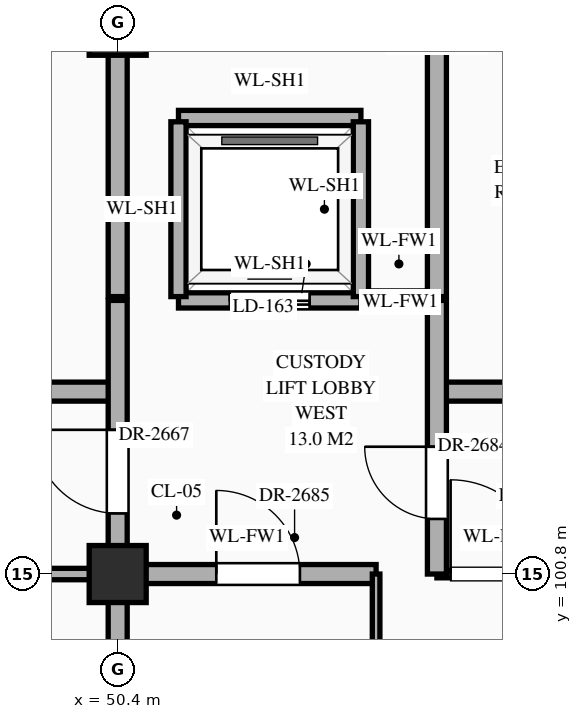
"""IFC4 building model, lengths in metres.
Left out: names, types, materials, properties, quantities, classifications, styles, units other than length and angle.
Written with IfcOpenShell. Run it as: python <this file> out.ifc"""

import sys

from ifc_helpers import new_model, si_unit, direction, frame, frame_2d, origin, origin_2d, place, context, subcontext, project, spatial, rectangle, extrude, element, fill, save


model = new_model("IFC4")
c1 = context("Model", 3, precision=1e-05, world=origin(), true_north=direction((0.0, 1.0)))
c2 = subcontext(c1, "Body", "Model", "MODEL_VIEW")
j1 = project(units=[si_unit("LENGTHUNIT", "METRE"), si_unit("PLANEANGLEUNIT", "RADIAN")], contexts=[c1])
p1 = place(None, origin())
s1 = spatial("IfcSite", under=j1, at=p1, CompositionType="ELEMENT")
p2 = place(p1, origin())
s2 = spatial("IfcBuilding", under=s1, at=p2, CompositionType="ELEMENT")
p3 = place(p2, frame((0.0, 0.0, 39.3)))
s3 = spatial("IfcBuildingStorey", under=s2, at=p3, CompositionType="ELEMENT", Elevation=39.3)
for number, where, z_axis, x_axis in (
    (1, (50.4, 100.8, 0.0), (0.0, 0.0, 1.0), (1.0, 0.0, 0.0)),
    (2, (50.4, 108.0, 0.0), (0.0, 0.0, 1.0), (1.0, 0.0, 0.0)),
):
    element("IfcColumn", number, at=place(p3, frame(where, z_axis=z_axis, x_axis=x_axis)), inside=s3, PredefinedType="COLUMN", context=c2, shape_type="SweptSolid", body=[
        extrude(rectangle(XDim=0.75, YDim=0.75, at=origin_2d()), origin(), (0.0, 0.0, 1.0), 4.2),
    ])
p4 = place(p3, frame((46.2, 100.8, 0.0), z_axis=(0.0, 0.0, 1.0), x_axis=(1.0, 0.0, 0.0)))
e3 = element("IfcWall", 3, at=p4, inside=s3, PredefinedType="STANDARD", context=c2, shape_type="SweptSolid", body=[
    extrude(rectangle(XDim=4.2, YDim=0.15, at=frame_2d((2.1, 0.0))), origin(), (0.0, 0.0, 1.0), 3.1),
])
p5 = place(p4, frame((1.373, 0.0, 0.0)))
e4 = element("IfcOpeningElement", 4, at=p5, cuts=e3, PredefinedType="OPENING", context=c2, shape_type="SweptSolid", body=[
    extrude(rectangle(XDim=1.16, YDim=2.3, at=frame_2d((0.58, 1.15))), frame((0.0, 0.087, 0.0), z_axis=(0.0, -1.0, 0.0), x_axis=(1.0, 0.0, 0.0)), (0.0, 0.0, 1.0), 0.174),
])
p6 = place(p3, frame((50.4, 100.8, 0.0), z_axis=(0.0, 0.0, 1.0), x_axis=(1.0, 0.0, 0.0)))
e5 = element("IfcWall", 5, at=p6, inside=s3, PredefinedType="STANDARD", context=c2, shape_type="SweptSolid", body=[
    extrude(rectangle(XDim=3.4, YDim=0.25, at=frame_2d((1.7, 0.0))), origin(), (0.0, 0.0, 1.0), 3.1),
])
p7 = place(p6, frame((1.298, 0.0, 0.0)))
e6 = element("IfcOpeningElement", 6, at=p7, cuts=e5, PredefinedType="OPENING", context=c2, shape_type="SweptSolid", body=[
    extrude(rectangle(XDim=1.1, YDim=2.2, at=frame_2d((0.55, 1.1))), frame((0.0, 0.137, 0.0), z_axis=(0.0, -1.0, 0.0), x_axis=(1.0, 0.0, 0.0)), (0.0, 0.0, 1.0), 0.274),
])
p8 = place(p3, frame((54.6, 100.8, 0.0), z_axis=(0.0, 0.0, 1.0), x_axis=(1.0, 0.0, 0.0)))
e7 = element("IfcWall", 7, at=p8, inside=s3, PredefinedType="STANDARD", context=c2, shape_type="SweptSolid", body=[
    extrude(rectangle(XDim=1.6, YDim=0.1, at=frame_2d((0.8, 0.0))), origin(), (0.0, 0.0, 1.0), 3.1),
])
p9 = place(p8, frame((0.18, 0.0, 0.0)))
e8 = element("IfcOpeningElement", 8, at=p9, cuts=e7, PredefinedType="OPENING", context=c2, shape_type="SweptSolid", body=[
    extrude(rectangle(XDim=1.24, YDim=2.3, at=frame_2d((0.62, 1.15))), frame((0.0, 0.062, 0.0), z_axis=(0.0, -1.0, 0.0), x_axis=(1.0, 0.0, 0.0)), (0.0, 0.0, 1.0), 0.124),
])
p10 = place(p3, frame((46.2, 103.2, 0.0), z_axis=(0.0, 0.0, 1.0), x_axis=(1.0, 0.0, 0.0)))
e9 = element("IfcWall", 9, at=p10, inside=s3, PredefinedType="STANDARD", context=c2, shape_type="SweptSolid", body=[
    extrude(rectangle(XDim=4.2, YDim=0.25, at=frame_2d((2.1, 0.0))), origin(), (0.0, 0.0, 1.0), 3.95),
])
p11 = place(p10, frame((1.625, 0.0, 0.0)))
e10 = element("IfcOpeningElement", 10, at=p11, cuts=e9, PredefinedType="OPENING", context=c2, shape_type="SweptSolid", body=[
    extrude(rectangle(XDim=0.95, YDim=2.15, at=frame_2d((0.475, 1.075))), frame((0.0, 0.137, 0.0), z_axis=(0.0, -1.0, 0.0), x_axis=(1.0, 0.0, 0.0)), (0.0, 0.0, 1.0), 0.274),
])
p12 = place(p3, frame((54.6, 103.2, 0.0), z_axis=(0.0, 0.0, 1.0), x_axis=(1.0, 0.0, 0.0)))
e11 = element("IfcWall", 11, at=p12, inside=s3, PredefinedType="STANDARD", context=c2, shape_type="SweptSolid", body=[
    extrude(rectangle(XDim=4.2, YDim=0.25, at=frame_2d((2.1, 0.0))), origin(), (0.0, 0.0, 1.0), 3.95),
])
p13 = place(p12, frame((1.6, 0.0, 0.0)))
e12 = element("IfcOpeningElement", 12, at=p13, cuts=e11, PredefinedType="OPENING", context=c2, shape_type="SweptSolid", body=[
    extrude(rectangle(XDim=1.0, YDim=2.2, at=frame_2d((0.5, 1.1))), frame((0.0, 0.137, 0.0), z_axis=(0.0, -1.0, 0.0), x_axis=(1.0, 0.0, 0.0)), (0.0, 0.0, 1.0), 0.274),
])
p14 = place(p3, frame((51.2, 104.4, 0.0), z_axis=(0.0, 0.0, 1.0), x_axis=(1.0, 0.0, 0.0)))
e13 = element("IfcWall", 13, at=p14, inside=s3, PredefinedType="STANDARD", context=c2, shape_type="SweptSolid", body=[
    extrude(rectangle(XDim=2.4, YDim=0.2, at=frame_2d((1.2, 0.0))), origin(), (0.0, 0.0, 1.0), 3.95),
])
p15 = place(p14, frame((0.675, 0.0, 0.0)))
e14 = element("IfcOpeningElement", 14, at=p15, cuts=e13, PredefinedType="OPENING", context=c2, shape_type="SweptSolid", body=[
    extrude(rectangle(XDim=1.05, YDim=2.15, at=frame_2d((0.525, 1.075))), frame((0.0, 0.112, 0.0), z_axis=(0.0, -1.0, 0.0), x_axis=(1.0, 0.0, 0.0)), (0.0, 0.0, 1.0), 0.224),
])
p16 = place(p3, frame((53.65, 104.4, 0.0), z_axis=(0.0, 0.0, 1.0), x_axis=(1.0, 0.0, 0.0)))
e15 = element("IfcWall", 15, at=p16, inside=s3, PredefinedType="STANDARD", context=c2, shape_type="SweptSolid", body=[
    extrude(rectangle(XDim=0.9, YDim=0.25, at=frame_2d((0.45, 0.0))), origin(), (0.0, 0.0, 1.0), 3.95),
])
p17 = place(p3, frame((51.2, 106.8, 0.0), z_axis=(0.0, 0.0, 1.0), x_axis=(1.0, 0.0, 0.0)))
e16 = element("IfcWall", 16, at=p17, inside=s3, PredefinedType="STANDARD", context=c2, shape_type="SweptSolid", body=[
    extrude(rectangle(XDim=2.4, YDim=0.2, at=frame_2d((1.2, 0.0))), origin(), (0.0, 0.0, 1.0), 3.95),
])
p18 = place(p3, frame((50.4, 91.2, 0.0), z_axis=(0.0, 0.0, 1.0), x_axis=(0.0, 1.0, 0.0)))
e17 = element("IfcWall", 17, at=p18, inside=s3, PredefinedType="STANDARD", context=c2, shape_type="SweptSolid", body=[
    extrude(rectangle(XDim=13.2, YDim=0.25, at=frame_2d((6.6, 0.0))), origin(), (0.0, 0.0, 1.0), 3.2),
])
p19 = place(p18, frame((0.502, 0.0, 0.0)))
e18 = element("IfcOpeningElement", 18, at=p19, cuts=e17, PredefinedType="OPENING", context=c2, shape_type="SweptSolid", body=[
    extrude(rectangle(XDim=1.1, YDim=2.2, at=frame_2d((0.55, 1.1))), frame((0.0, 0.137, 0.0), z_axis=(0.0, -1.0, 0.0), x_axis=(1.0, 0.0, 0.0)), (0.0, 0.0, 1.0), 0.274),
])
p20 = place(p18, frame((10.397, 0.0, 0.0)))
e19 = element("IfcOpeningElement", 19, at=p20, cuts=e17, PredefinedType="OPENING", context=c2, shape_type="SweptSolid", body=[
    extrude(rectangle(XDim=1.1, YDim=2.2, at=frame_2d((0.55, 1.1))), frame((0.0, 0.137, 0.0), z_axis=(0.0, -1.0, 0.0), x_axis=(1.0, 0.0, 0.0)), (0.0, 0.0, 1.0), 0.274),
])
p21 = place(p18, frame((3.248, 0.0, 0.0)))
e20 = element("IfcOpeningElement", 20, at=p21, cuts=e17, PredefinedType="OPENING", context=c2, shape_type="SweptSolid", body=[
    extrude(rectangle(XDim=1.0, YDim=2.2, at=frame_2d((0.5, 1.1))), frame((0.0, 0.137, 0.0), z_axis=(0.0, -1.0, 0.0), x_axis=(1.0, 0.0, 0.0)), (0.0, 0.0, 1.0), 0.274),
])
p22 = place(p3, frame((50.4, 104.45, 0.0), z_axis=(0.0, 0.0, 1.0), x_axis=(0.0, 1.0, 0.0)))
e21 = element("IfcWall", 21, at=p22, inside=s3, PredefinedType="STANDARD", context=c2, shape_type="SweptSolid", body=[
    extrude(rectangle(XDim=3.46, YDim=0.25, at=frame_2d((1.73, 0.0))), origin(), (0.0, 0.0, 1.0), 3.2),
])
for number, where, z_axis, x_axis in (
    (22, (51.2, 104.45, 0.0), (0.0, 0.0, 1.0), (0.0, 1.0, 0.0)),
    (23, (53.6, 104.45, 0.0), (0.0, 0.0, 1.0), (0.0, 1.0, 0.0)),
):
    element("IfcWall", number, at=place(p3, frame(where, z_axis=z_axis, x_axis=x_axis)), inside=s3, PredefinedType="STANDARD", context=c2, shape_type="SweptSolid", body=[
        extrude(rectangle(XDim=2.3, YDim=0.2, at=frame_2d((1.15, 0.0))), origin(), (0.0, 0.0, 1.0), 3.95),
    ])
p23 = place(p3, frame((53.8, 96.0, 0.0), z_axis=(0.0, 0.0, 1.0), x_axis=(0.0, 1.0, 0.0)))
e24 = element("IfcWall", 24, at=p23, inside=s3, PredefinedType="STANDARD", context=c2, shape_type="SweptSolid", body=[
    extrude(rectangle(XDim=4.8, YDim=0.1, at=frame_2d((2.4, 0.0))), origin(), (0.0, 0.0, 1.0), 3.95),
])
p24 = place(p23, frame((1.97, 0.0, 0.0)))
e25 = element("IfcOpeningElement", 25, at=p24, cuts=e24, PredefinedType="OPENING", context=c2, shape_type="SweptSolid", body=[
    extrude(rectangle(XDim=0.86, YDim=2.1, at=frame_2d((0.43, 1.05))), frame((0.0, 0.062, 0.0), z_axis=(0.0, -1.0, 0.0), x_axis=(1.0, 0.0, 0.0)), (0.0, 0.0, 1.0), 0.124),
])
p25 = place(p3, frame((54.6, 100.8, 0.0), z_axis=(0.0, 0.0, 1.0), x_axis=(0.0, 1.0, 0.0)))
e26 = element("IfcWall", 26, at=p25, inside=s3, PredefinedType="STANDARD", context=c2, shape_type="SweptSolid", body=[
    extrude(rectangle(XDim=3.6, YDim=0.25, at=frame_2d((1.8, 0.0))), origin(), (0.0, 0.0, 1.0), 3.65),
])
p26 = place(p25, frame((0.725, 0.0, 0.0)))
e27 = element("IfcOpeningElement", 27, at=p26, cuts=e26, PredefinedType="OPENING", context=c2, shape_type="SweptSolid", body=[
    extrude(rectangle(XDim=0.95, YDim=2.15, at=frame_2d((0.475, 1.075))), frame((0.0, 0.137, 0.0), z_axis=(0.0, -1.0, 0.0), x_axis=(1.0, 0.0, 0.0)), (0.0, 0.0, 1.0), 0.274),
])
p27 = place(p3, frame((54.6, 104.45, 0.0), z_axis=(0.0, 0.0, 1.0), x_axis=(0.0, 1.0, 0.0)))
e28 = element("IfcWall", 28, at=p27, inside=s3, PredefinedType="STANDARD", context=c2, shape_type="SweptSolid", body=[
    extrude(rectangle(XDim=3.5, YDim=0.25, at=frame_2d((1.75, 0.0))), origin(), (0.0, 0.0, 1.0), 3.65),
])
p28 = place(p15, origin())
e29 = element("IfcDoor", 29, at=p28, inside=s3, OperationType="DOUBLE_DOOR_SLIDING", PredefinedType="DOOR", context=c2, shape_type="SweptSolid", body=[
    extrude(rectangle(XDim=1.05, YDim=2.15, at=frame_2d((0.525, 1.075))), frame((0.0, 0.025, 0.0), z_axis=(0.0, -1.0, 0.0), x_axis=(1.0, 0.0, 0.0)), (0.0, 0.0, 1.0), 0.05),
])
fill(e14, e29)
p29 = place(p20, origin())
e30 = element("IfcDoor", 30, at=p29, inside=s3, OperationType="SINGLE_SWING_RIGHT", PredefinedType="DOOR", context=c2, shape_type="SweptSolid", body=[
    extrude(rectangle(XDim=1.1, YDim=2.2, at=frame_2d((0.55, 1.1))), frame((0.0, 0.025, 0.0), z_axis=(0.0, -1.0, 0.0), x_axis=(1.0, 0.0, 0.0)), (0.0, 0.0, 1.0), 0.05),
])
fill(e19, e30)
p30 = place(p26, origin())
e31 = element("IfcDoor", 31, at=p30, inside=s3, OperationType="SINGLE_SWING_RIGHT", PredefinedType="DOOR", context=c2, shape_type="SweptSolid", body=[
    extrude(rectangle(XDim=0.95, YDim=2.15, at=frame_2d((0.475, 1.075))), frame((0.0, 0.025, 0.0), z_axis=(0.0, -1.0, 0.0), x_axis=(1.0, 0.0, 0.0)), (0.0, 0.0, 1.0), 0.05),
])
fill(e27, e31)
p31 = place(p7, origin())
e32 = element("IfcDoor", 32, at=p31, inside=s3, OperationType="SINGLE_SWING_LEFT", PredefinedType="DOOR", context=c2, shape_type="SweptSolid", body=[
    extrude(rectangle(XDim=1.1, YDim=2.2, at=frame_2d((0.55, 1.1))), frame((0.0, 0.025, 0.0), z_axis=(0.0, -1.0, 0.0), x_axis=(1.0, 0.0, 0.0)), (0.0, 0.0, 1.0), 0.05),
])
fill(e6, e32)
p32 = place(p9, origin())
e33 = element("IfcDoor", 33, at=p32, inside=s3, OperationType="SINGLE_SWING_LEFT", PredefinedType="DOOR", context=c2, shape_type="SweptSolid", body=[
    extrude(rectangle(XDim=1.24, YDim=2.3, at=frame_2d((0.62, 1.15))), frame((0.0, 0.025, 0.0), z_axis=(0.0, -1.0, 0.0), x_axis=(1.0, 0.0, 0.0)), (0.0, 0.0, 1.0), 0.05),
])
fill(e8, e33)
save(model, sys.argv[1])
